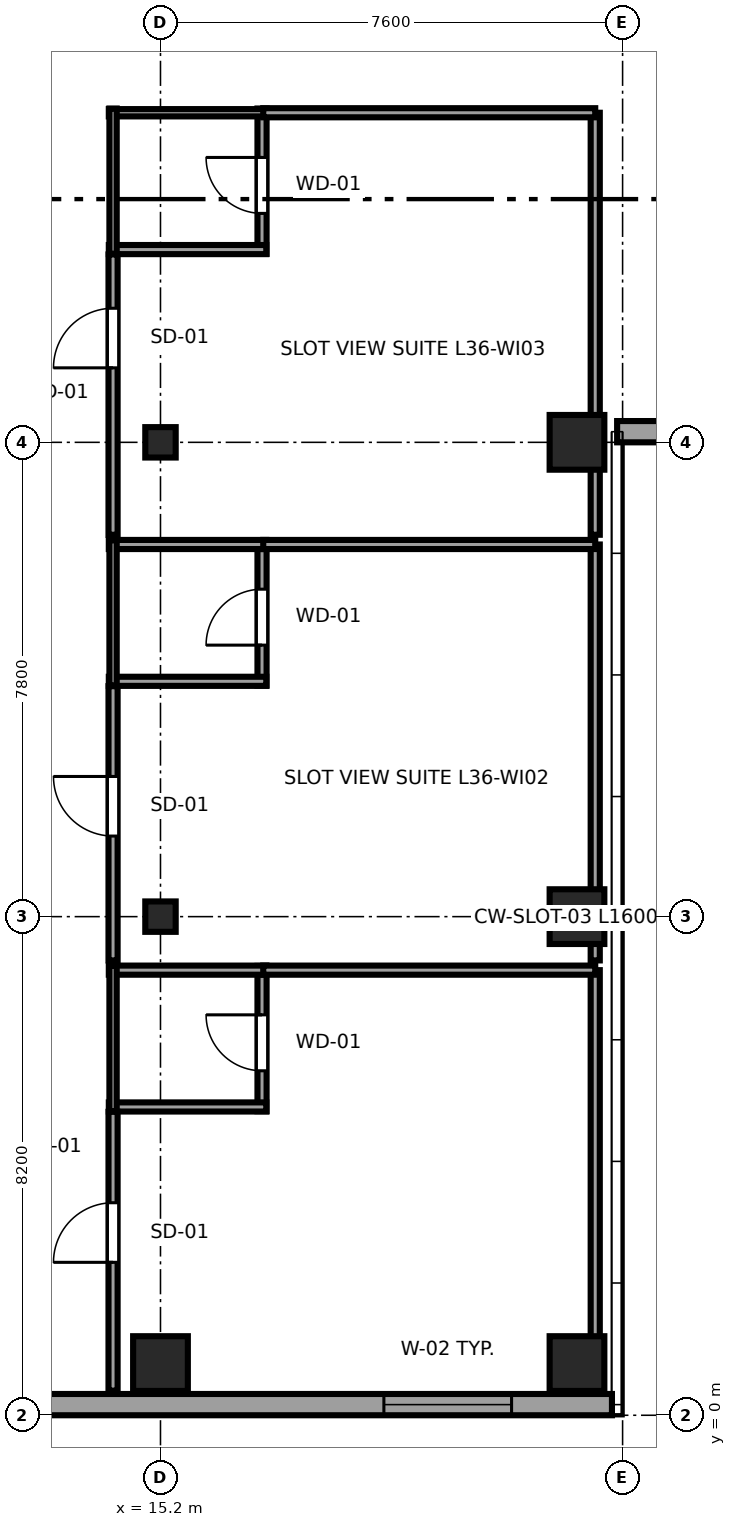
"""IFC4 building model, lengths in metres.
Left out: names, types, materials, properties, quantities, classifications, styles, units other than length and angle.
Written with IfcOpenShell. Run it as: python <this file> out.ifc"""

import sys

from ifc_helpers import new_model, si_unit, direction, frame, frame_2d, origin, origin_2d, place, context, subcontext, project, spatial, rectangle, i_section, extrude, source, transform, mapped, element, fill, save


model = new_model("IFC4")
c1 = context("Model", 3, precision=1e-05, world=origin(), true_north=direction((0.0, 1.0)))
c2 = subcontext(c1, "Body", "Model", "MODEL_VIEW")
j1 = project(units=[si_unit("LENGTHUNIT", "METRE"), si_unit("PLANEANGLEUNIT", "RADIAN")], contexts=[c1])
p1 = place(None, origin())
s1 = spatial("IfcSite", under=j1, at=p1, CompositionType="ELEMENT")
p2 = place(p1, origin())
s2 = spatial("IfcBuilding", under=s1, at=p2, CompositionType="ELEMENT")
p3 = place(p2, frame((0.0, 0.0, 139.95)))
s3 = spatial("IfcBuildingStorey", under=s2, at=p3, CompositionType="ELEMENT", Elevation=139.95)
m1 = source(origin(), c2, "Body", "SweptSolid", [
    extrude(rectangle(XDim=0.9, YDim=0.9, at=origin_2d()), origin(), (0.0, 0.0, 1.0), 3.55),
])
p4 = place(p3, frame((15.2, 0.85, 0.0), z_axis=(0.0, 0.0, 1.0), x_axis=(1.0, 0.0, 0.0)))
e1 = element("IfcColumn", 1, at=p4, inside=s3, PredefinedType="COLUMN", context=c2, shape_type="MappedRepresentation", body=[
    mapped(m1, transform((0.0, 0.0, 0.0), x_axis=(1.0, 0.0, 0.0), y_axis=(0.0, 1.0, 0.0), z_axis=(0.0, 0.0, 1.0), scale=1.0)),
])
m2 = source(origin(), c2, "Body", "SweptSolid", [
    extrude(i_section(OverallWidth=0.5, OverallDepth=0.5, WebThickness=0.022, FlangeThickness=0.034, at=origin_2d()), origin(), (0.0, 0.0, 1.0), 3.55),
])
for number, where, z_axis, x_axis in (
    (2, (15.2, 8.2, 0.0), (0.0, 0.0, 1.0), (1.0, 0.0, 0.0)),
    (3, (15.2, 16.0, 0.0), (0.0, 0.0, 1.0), (1.0, 0.0, 0.0)),
):
    element("IfcColumn", number, at=place(p3, frame(where, z_axis=z_axis, x_axis=x_axis)), inside=s3, PredefinedType="COLUMN", context=c2, shape_type="MappedRepresentation", body=[
        mapped(m2, transform((0.0, 0.0, 0.0), x_axis=(1.0, 0.0, 0.0), y_axis=(0.0, 1.0, 0.0), z_axis=(0.0, 0.0, 1.0), scale=1.0)),
    ])
for number, where, z_axis, x_axis in (
    (4, (22.05, 0.85, 0.0), (0.0, 0.0, 1.0), (1.0, 0.0, 0.0)),
    (5, (22.05, 8.2, 0.0), (0.0, 0.0, 1.0), (1.0, 0.0, 0.0)),
    (6, (22.05, 16.0, 0.0), (0.0, 0.0, 1.0), (1.0, 0.0, 0.0)),
):
    element("IfcColumn", number, at=place(p3, frame(where, z_axis=z_axis, x_axis=x_axis)), inside=s3, PredefinedType="COLUMN", context=c2, shape_type="MappedRepresentation", body=[
        mapped(m1, transform((0.0, 0.0, 0.0), x_axis=(1.0, 0.0, 0.0), y_axis=(0.0, 1.0, 0.0), z_axis=(0.0, 0.0, 1.0), scale=1.0)),
    ])
p5 = place(p3, frame((4.617, 0.175, 0.0), z_axis=(0.0, 0.0, 1.0), x_axis=(1.0, 0.0, 0.0)))
e7 = element("IfcWall", 7, at=p5, inside=s3, PredefinedType="SOLIDWALL", context=c2, shape_type="SweptSolid", body=[
    extrude(rectangle(XDim=18.008, YDim=0.35, at=frame_2d((9.004, 0.0))), origin(), (0.0, 0.0, 1.0), 3.37),
])
p6 = place(p5, frame((5.303, 0.0, 0.68)))
e8 = element("IfcOpeningElement", 8, at=p6, cuts=e7, PredefinedType="OPENING", context=c2, shape_type="SweptSolid", body=[
    extrude(rectangle(XDim=2.1, YDim=1.9, at=frame_2d((1.05, 0.95))), frame((0.0, 0.185, 0.0), z_axis=(0.0, -1.0, 0.0), x_axis=(1.0, 0.0, 0.0)), (0.0, 0.0, 1.0), 0.37),
])
p7 = place(p5, frame((14.257, 0.0, 0.68)))
e9 = element("IfcOpeningElement", 9, at=p7, cuts=e7, PredefinedType="OPENING", context=c2, shape_type="SweptSolid", body=[
    extrude(rectangle(XDim=2.1, YDim=1.9, at=frame_2d((1.05, 0.95))), frame((0.0, 0.185, 0.0), z_axis=(0.0, -1.0, 0.0), x_axis=(1.0, 0.0, 0.0)), (0.0, 0.0, 1.0), 0.37),
])
p8 = place(p3, frame((22.71, 16.175, 0.0), z_axis=(0.0, 0.0, 1.0), x_axis=(1.0, 0.0, 0.0)))
e10 = element("IfcWall", 10, at=p8, inside=s3, PredefinedType="SOLIDWALL", context=c2, shape_type="SweptSolid", body=[
    extrude(rectangle(XDim=11.58, YDim=0.35, at=frame_2d((5.79, 0.0))), origin(), (0.0, 0.0, 1.0), 2.748),
])
p9 = place(p8, frame((2.145, 0.0, 0.68)))
e11 = element("IfcOpeningElement", 11, at=p9, cuts=e10, PredefinedType="OPENING", context=c2, shape_type="SweptSolid", body=[
    extrude(rectangle(XDim=2.1, YDim=1.9, at=frame_2d((1.05, 0.95))), frame((0.0, 0.185, 0.0), z_axis=(0.0, -1.0, 0.0), x_axis=(1.0, 0.0, 0.0)), (0.0, 0.0, 1.0), 0.37),
])
p10 = place(p8, frame((7.335, 0.0, 0.68)))
e12 = element("IfcOpeningElement", 12, at=p10, cuts=e10, PredefinedType="OPENING", context=c2, shape_type="SweptSolid", body=[
    extrude(rectangle(XDim=2.1, YDim=1.9, at=frame_2d((1.05, 0.95))), frame((0.0, 0.185, 0.0), z_axis=(0.0, -1.0, 0.0), x_axis=(1.0, 0.0, 0.0)), (0.0, 0.0, 1.0), 0.37),
])
p11 = place(p3, frame((16.87, 5.0, 0.0), z_axis=(0.0, 0.0, 1.0), x_axis=(0.0, 1.0, 0.0)))
e13 = element("IfcWall", 13, at=p11, inside=s3, PredefinedType="PARTITIONING", context=c2, shape_type="SweptSolid", body=[
    extrude(rectangle(XDim=2.39, YDim=0.15, at=frame_2d((1.195, 0.0))), origin(), (0.0, 0.0, 1.0), 3.37),
])
p12 = place(p11, frame((0.665, 0.0, 0.0)))
e14 = element("IfcOpeningElement", 14, at=p12, cuts=e13, PredefinedType="OPENING", context=c2, shape_type="SweptSolid", body=[
    extrude(rectangle(XDim=0.92, YDim=2.01, at=frame_2d((0.46, 1.005))), frame((0.0, 0.085, 0.0), z_axis=(0.0, -1.0, 0.0), x_axis=(1.0, 0.0, 0.0)), (0.0, 0.0, 1.0), 0.17),
])
for number, where, z_axis, x_axis in (
    (15, (14.35, 5.07, 0.0), (0.0, 0.0, 1.0), (1.0, 0.0, 0.0)),
    (16, (14.35, 7.32, 0.0), (0.0, 0.0, 1.0), (1.0, 0.0, 0.0)),
):
    element("IfcWall", number, at=place(p3, frame(where, z_axis=z_axis, x_axis=x_axis)), inside=s3, PredefinedType="PARTITIONING", context=c2, shape_type="SweptSolid", body=[
        extrude(rectangle(XDim=2.59, YDim=0.15, at=frame_2d((1.295, 0.0))), origin(), (0.0, 0.0, 1.0), 3.37),
    ])
p13 = place(p3, frame((14.42, 5.0, 0.0), z_axis=(0.0, 0.0, 1.0), x_axis=(0.0, 1.0, 0.0)))
e17 = element("IfcWall", 17, at=p13, inside=s3, PredefinedType="PLUMBINGWALL", context=c2, shape_type="SweptSolid", body=[
    extrude(rectangle(XDim=2.39, YDim=0.12, at=frame_2d((1.195, 0.0))), origin(), (0.0, 0.0, 1.0), 3.37),
])
p14 = place(p3, frame((16.87, 12.0, 0.0), z_axis=(0.0, 0.0, 1.0), x_axis=(0.0, 1.0, 0.0)))
e18 = element("IfcWall", 18, at=p14, inside=s3, PredefinedType="PARTITIONING", context=c2, shape_type="SweptSolid", body=[
    extrude(rectangle(XDim=2.39, YDim=0.15, at=frame_2d((1.195, 0.0))), origin(), (0.0, 0.0, 1.0), 3.37),
])
p15 = place(p14, frame((0.665, 0.0, 0.0)))
e19 = element("IfcOpeningElement", 19, at=p15, cuts=e18, PredefinedType="OPENING", context=c2, shape_type="SweptSolid", body=[
    extrude(rectangle(XDim=0.92, YDim=2.01, at=frame_2d((0.46, 1.005))), frame((0.0, 0.085, 0.0), z_axis=(0.0, -1.0, 0.0), x_axis=(1.0, 0.0, 0.0)), (0.0, 0.0, 1.0), 0.17),
])
for number, where, z_axis, x_axis in (
    (20, (14.35, 12.07, 0.0), (0.0, 0.0, 1.0), (1.0, 0.0, 0.0)),
    (21, (14.35, 14.32, 0.0), (0.0, 0.0, 1.0), (1.0, 0.0, 0.0)),
):
    element("IfcWall", number, at=place(p3, frame(where, z_axis=z_axis, x_axis=x_axis)), inside=s3, PredefinedType="PARTITIONING", context=c2, shape_type="SweptSolid", body=[
        extrude(rectangle(XDim=2.59, YDim=0.15, at=frame_2d((1.295, 0.0))), origin(), (0.0, 0.0, 1.0), 3.37),
    ])
p16 = place(p3, frame((14.42, 12.0, 0.0), z_axis=(0.0, 0.0, 1.0), x_axis=(0.0, 1.0, 0.0)))
e22 = element("IfcWall", 22, at=p16, inside=s3, PredefinedType="PLUMBINGWALL", context=c2, shape_type="SweptSolid", body=[
    extrude(rectangle(XDim=2.39, YDim=0.12, at=frame_2d((1.195, 0.0))), origin(), (0.0, 0.0, 1.0), 3.37),
])
p17 = place(p3, frame((16.87, 19.1, 0.0), z_axis=(0.0, 0.0, 1.0), x_axis=(0.0, 1.0, 0.0)))
e23 = element("IfcWall", 23, at=p17, inside=s3, PredefinedType="PARTITIONING", context=c2, shape_type="SweptSolid", body=[
    extrude(rectangle(XDim=2.39, YDim=0.15, at=frame_2d((1.195, 0.0))), origin(), (0.0, 0.0, 1.0), 3.37),
])
p18 = place(p17, frame((0.665, 0.0, 0.0)))
e24 = element("IfcOpeningElement", 24, at=p18, cuts=e23, PredefinedType="OPENING", context=c2, shape_type="SweptSolid", body=[
    extrude(rectangle(XDim=0.92, YDim=2.01, at=frame_2d((0.46, 1.005))), frame((0.0, 0.085, 0.0), z_axis=(0.0, -1.0, 0.0), x_axis=(1.0, 0.0, 0.0)), (0.0, 0.0, 1.0), 0.17),
])
p19 = place(p3, frame((14.35, 19.17, 0.0), z_axis=(0.0, 0.0, 1.0), x_axis=(1.0, 0.0, 0.0)))
e25 = element("IfcWall", 25, at=p19, inside=s3, PredefinedType="PARTITIONING", context=c2, shape_type="SweptSolid", body=[
    extrude(rectangle(XDim=2.59, YDim=0.15, at=frame_2d((1.295, 0.0))), origin(), (0.0, 0.0, 1.0), 3.37),
])
p20 = place(p3, frame((14.35, 21.42, 0.0), z_axis=(0.0, 0.0, 1.0), x_axis=(1.0, 0.0, 0.0)))
e26 = element("IfcWall", 26, at=p20, inside=s3, PredefinedType="PLUMBINGWALL", context=c2, shape_type="SweptSolid", body=[
    extrude(rectangle(XDim=2.59, YDim=0.12, at=frame_2d((1.295, 0.0))), origin(), (0.0, 0.0, 1.0), 3.37),
])
p21 = place(p3, frame((14.42, 19.1, 0.0), z_axis=(0.0, 0.0, 1.0), x_axis=(0.0, 1.0, 0.0)))
e27 = element("IfcWall", 27, at=p21, inside=s3, PredefinedType="PLUMBINGWALL", context=c2, shape_type="SweptSolid", body=[
    extrude(rectangle(XDim=2.39, YDim=0.12, at=frame_2d((1.195, 0.0))), origin(), (0.0, 0.0, 1.0), 3.37),
])
p22 = place(p3, frame((14.42, 0.405, 0.0), z_axis=(0.0, 0.0, 1.0), x_axis=(0.0, 1.0, 0.0)))
e28 = element("IfcWall", 28, at=p22, inside=s3, PredefinedType="PARTITIONING", context=c2, shape_type="SweptSolid", body=[
    extrude(rectangle(XDim=4.585, YDim=0.15, at=frame_2d((2.292, 0.0))), origin(), (0.0, 0.0, 1.0), 3.37),
])
p23 = place(p22, frame((2.11, 0.0, 0.0)))
e29 = element("IfcOpeningElement", 29, at=p23, cuts=e28, PredefinedType="OPENING", context=c2, shape_type="SweptSolid", body=[
    extrude(rectangle(XDim=0.98, YDim=2.12, at=frame_2d((0.49, 1.06))), frame((0.0, 0.085, 0.0), z_axis=(0.0, -1.0, 0.0), x_axis=(1.0, 0.0, 0.0)), (0.0, 0.0, 1.0), 0.17),
])
p24 = place(p3, frame((22.35, 0.405, 0.0), z_axis=(0.0, 0.0, 1.0), x_axis=(0.0, 1.0, 0.0)))
e30 = element("IfcWall", 30, at=p24, inside=s3, PredefinedType="PARTITIONING", context=c2, shape_type="SweptSolid", body=[
    extrude(rectangle(XDim=6.915, YDim=0.15, at=frame_2d((3.458, 0.0))), origin(), (0.0, 0.0, 1.0), 3.37),
])
p25 = place(p3, frame((16.89, 7.32, 0.0), z_axis=(0.0, 0.0, 1.0), x_axis=(1.0, 0.0, 0.0)))
e31 = element("IfcWall", 31, at=p25, inside=s3, PredefinedType="PARTITIONING", context=c2, shape_type="SweptSolid", body=[
    extrude(rectangle(XDim=5.46, YDim=0.15, at=frame_2d((2.73, 0.0))), origin(), (0.0, 0.0, 1.0), 3.37),
])
p26 = place(p3, frame((14.42, 7.48, 0.0), z_axis=(0.0, 0.0, 1.0), x_axis=(0.0, 1.0, 0.0)))
e32 = element("IfcWall", 32, at=p26, inside=s3, PredefinedType="PARTITIONING", context=c2, shape_type="SweptSolid", body=[
    extrude(rectangle(XDim=4.51, YDim=0.15, at=frame_2d((2.255, 0.0))), origin(), (0.0, 0.0, 1.0), 3.37),
])
p27 = place(p26, frame((2.045, 0.0, 0.0)))
e33 = element("IfcOpeningElement", 33, at=p27, cuts=e32, PredefinedType="OPENING", context=c2, shape_type="SweptSolid", body=[
    extrude(rectangle(XDim=0.98, YDim=2.12, at=frame_2d((0.49, 1.06))), frame((0.0, 0.085, 0.0), z_axis=(0.0, -1.0, 0.0), x_axis=(1.0, 0.0, 0.0)), (0.0, 0.0, 1.0), 0.17),
])
p28 = place(p3, frame((22.35, 7.48, 0.0), z_axis=(0.0, 0.0, 1.0), x_axis=(0.0, 1.0, 0.0)))
e34 = element("IfcWall", 34, at=p28, inside=s3, PredefinedType="PARTITIONING", context=c2, shape_type="SweptSolid", body=[
    extrude(rectangle(XDim=6.84, YDim=0.15, at=frame_2d((3.42, 0.0))), origin(), (0.0, 0.0, 1.0), 3.37),
])
p29 = place(p3, frame((16.89, 14.32, 0.0), z_axis=(0.0, 0.0, 1.0), x_axis=(1.0, 0.0, 0.0)))
e35 = element("IfcWall", 35, at=p29, inside=s3, PredefinedType="PARTITIONING", context=c2, shape_type="SweptSolid", body=[
    extrude(rectangle(XDim=5.46, YDim=0.15, at=frame_2d((2.73, 0.0))), origin(), (0.0, 0.0, 1.0), 3.37),
])
p30 = place(p3, frame((14.42, 14.48, 0.0), z_axis=(0.0, 0.0, 1.0), x_axis=(0.0, 1.0, 0.0)))
e36 = element("IfcWall", 36, at=p30, inside=s3, PredefinedType="PARTITIONING", context=c2, shape_type="SweptSolid", body=[
    extrude(rectangle(XDim=4.61, YDim=0.15, at=frame_2d((2.305, 0.0))), origin(), (0.0, 0.0, 1.0), 3.37),
])
p31 = place(p30, frame((2.745, 0.0, 0.0)))
e37 = element("IfcOpeningElement", 37, at=p31, cuts=e36, PredefinedType="OPENING", context=c2, shape_type="SweptSolid", body=[
    extrude(rectangle(XDim=0.98, YDim=2.12, at=frame_2d((0.49, 1.06))), frame((0.0, 0.085, 0.0), z_axis=(0.0, -1.0, 0.0), x_axis=(1.0, 0.0, 0.0)), (0.0, 0.0, 1.0), 0.17),
])
p32 = place(p3, frame((22.35, 14.48, 0.0), z_axis=(0.0, 0.0, 1.0), x_axis=(0.0, 1.0, 0.0)))
e38 = element("IfcWall", 38, at=p32, inside=s3, PredefinedType="PARTITIONING", context=c2, shape_type="SweptSolid", body=[
    extrude(rectangle(XDim=6.94, YDim=0.15, at=frame_2d((3.47, 0.0))), origin(), (0.0, 0.0, 1.0), 3.37),
])
p33 = place(p3, frame((16.89, 21.42, 0.0), z_axis=(0.0, 0.0, 1.0), x_axis=(1.0, 0.0, 0.0)))
e39 = element("IfcWall", 39, at=p33, inside=s3, PredefinedType="PARTITIONING", context=c2, shape_type="SweptSolid", body=[
    extrude(rectangle(XDim=5.46, YDim=0.15, at=frame_2d((2.73, 0.0))), origin(), (0.0, 0.0, 1.0), 3.37),
])
m3 = source(origin(), c2, "Body", "SweptSolid", [
    extrude(rectangle(XDim=2.1, YDim=1.9, at=frame_2d((1.05, 0.95))), frame((0.0, 0.09, 0.0), z_axis=(0.0, -1.0, 0.0), x_axis=(1.0, 0.0, 0.0)), (0.0, 0.0, 1.0), 0.06),
])
p34 = place(p7, origin())
e40 = element("IfcWindow", 40, at=p34, inside=s3, PartitioningType="TRIPLE_PANEL_HORIZONTAL", PredefinedType="WINDOW", context=c2, shape_type="MappedRepresentation", body=[
    mapped(m3, transform((0.0, 0.0, 0.0), x_axis=(1.0, 0.0, 0.0), y_axis=(0.0, 1.0, 0.0), z_axis=(0.0, 0.0, 1.0), scale=1.0)),
])
fill(e9, e40)
m4 = source(origin(), c2, "Body", "SweptSolid", [
    extrude(rectangle(XDim=0.92, YDim=2.01, at=frame_2d((0.46, 1.005))), frame((0.0, 0.025, 0.0), z_axis=(0.0, -1.0, 0.0), x_axis=(1.0, 0.0, 0.0)), (0.0, 0.0, 1.0), 0.05),
])
p35 = place(p12, origin())
e41 = element("IfcDoor", 41, at=p35, inside=s3, OperationType="SINGLE_SWING_RIGHT", PredefinedType="DOOR", context=c2, shape_type="MappedRepresentation", body=[
    mapped(m4, transform((0.0, 0.0, 0.0), x_axis=(1.0, 0.0, 0.0), y_axis=(0.0, 1.0, 0.0), z_axis=(0.0, 0.0, 1.0), scale=1.0)),
])
fill(e14, e41)
p36 = place(p15, origin())
e42 = element("IfcDoor", 42, at=p36, inside=s3, OperationType="SINGLE_SWING_LEFT", PredefinedType="DOOR", context=c2, shape_type="MappedRepresentation", body=[
    mapped(m4, transform((0.0, 0.0, 0.0), x_axis=(1.0, 0.0, 0.0), y_axis=(0.0, 1.0, 0.0), z_axis=(0.0, 0.0, 1.0), scale=1.0)),
])
fill(e19, e42)
p37 = place(p18, origin())
e43 = element("IfcDoor", 43, at=p37, inside=s3, OperationType="SINGLE_SWING_RIGHT", PredefinedType="DOOR", context=c2, shape_type="MappedRepresentation", body=[
    mapped(m4, transform((0.0, 0.0, 0.0), x_axis=(1.0, 0.0, 0.0), y_axis=(0.0, 1.0, 0.0), z_axis=(0.0, 0.0, 1.0), scale=1.0)),
])
fill(e24, e43)
m5 = source(origin(), c2, "Body", "SweptSolid", [
    extrude(rectangle(XDim=0.98, YDim=2.12, at=frame_2d((0.49, 1.06))), frame((0.0, 0.025, 0.0), z_axis=(0.0, -1.0, 0.0), x_axis=(1.0, 0.0, 0.0)), (0.0, 0.0, 1.0), 0.05),
])
p38 = place(p23, origin())
e44 = element("IfcDoor", 44, at=p38, inside=s3, OperationType="SINGLE_SWING_LEFT", PredefinedType="DOOR", context=c2, shape_type="MappedRepresentation", body=[
    mapped(m5, transform((0.0, 0.0, 0.0), x_axis=(1.0, 0.0, 0.0), y_axis=(0.0, 1.0, 0.0), z_axis=(0.0, 0.0, 1.0), scale=1.0)),
])
fill(e29, e44)
p39 = place(p27, origin())
e45 = element("IfcDoor", 45, at=p39, inside=s3, OperationType="SINGLE_SWING_RIGHT", PredefinedType="DOOR", context=c2, shape_type="MappedRepresentation", body=[
    mapped(m5, transform((0.0, 0.0, 0.0), x_axis=(1.0, 0.0, 0.0), y_axis=(0.0, 1.0, 0.0), z_axis=(0.0, 0.0, 1.0), scale=1.0)),
])
fill(e33, e45)
p40 = place(p31, origin())
e46 = element("IfcDoor", 46, at=p40, inside=s3, OperationType="SINGLE_SWING_LEFT", PredefinedType="DOOR", context=c2, shape_type="MappedRepresentation", body=[
    mapped(m5, transform((0.0, 0.0, 0.0), x_axis=(1.0, 0.0, 0.0), y_axis=(0.0, 1.0, 0.0), z_axis=(0.0, 0.0, 1.0), scale=1.0)),
])
fill(e37, e46)
save(model, sys.argv[1])
